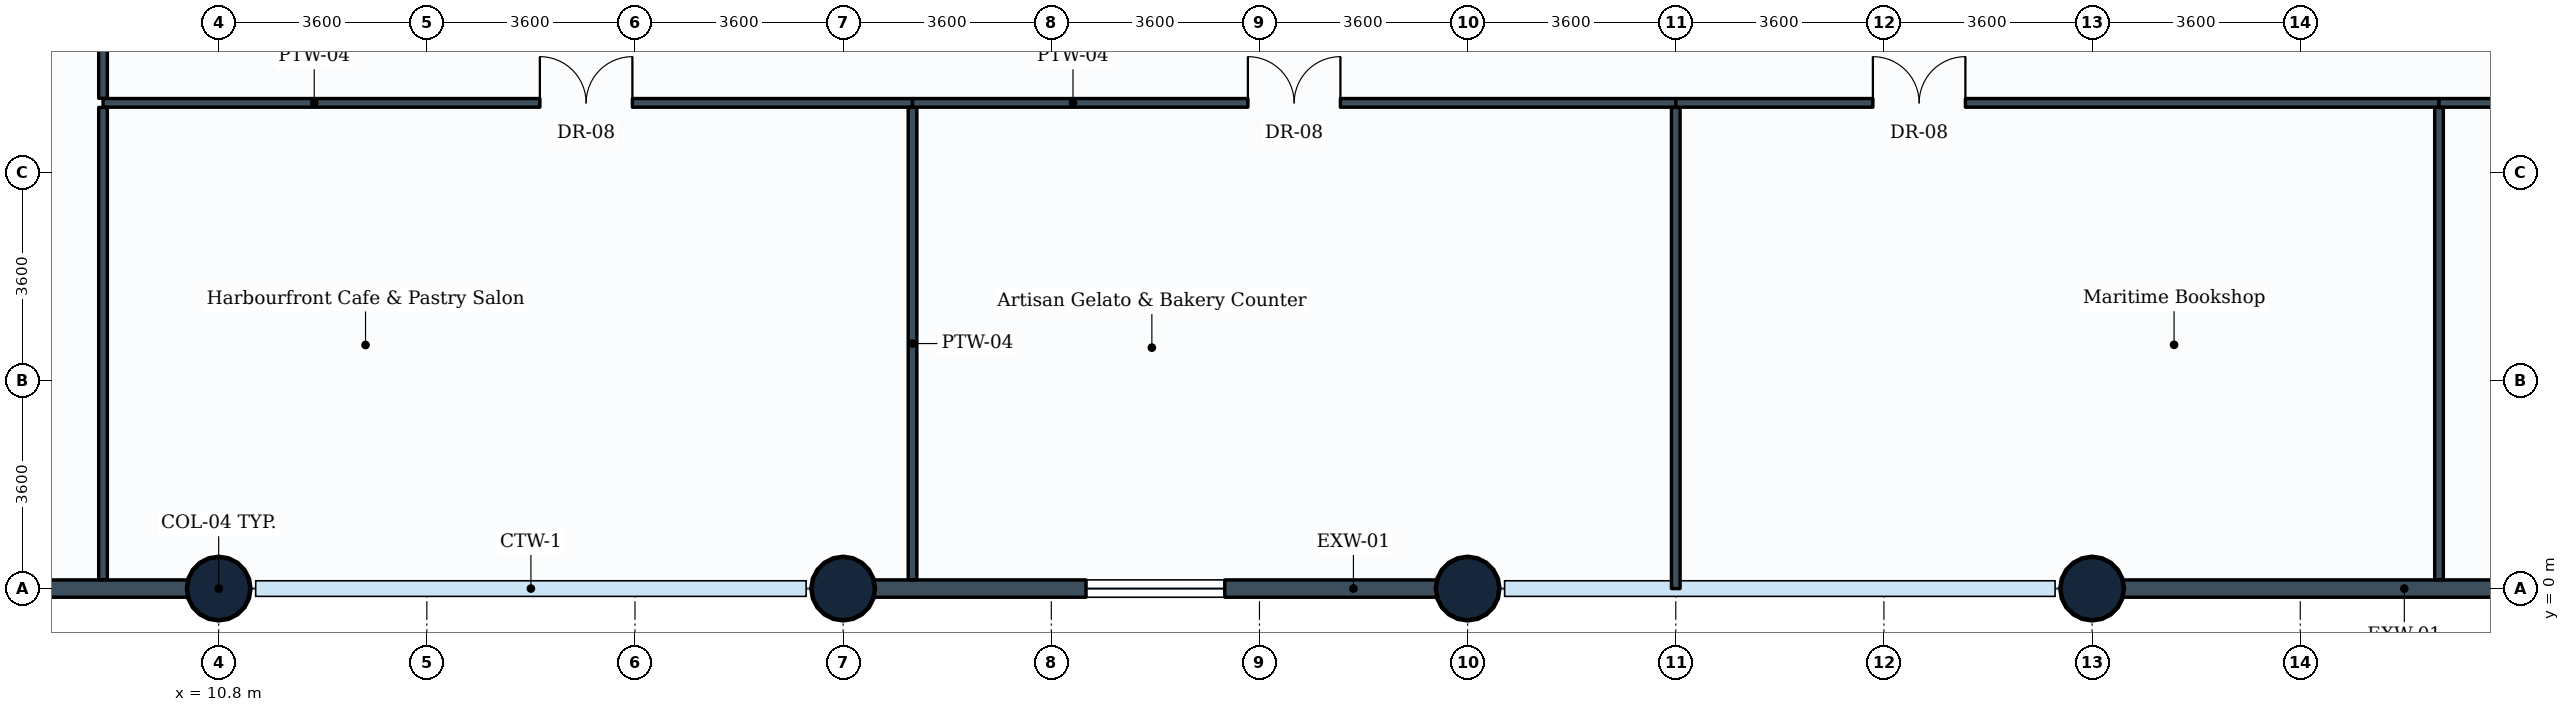
"""IFC4 building model, lengths in metres.
Left out: names, types, materials, properties, quantities, classifications, styles, units other than length and angle.
Written with IfcOpenShell. Run it as: python <this file> out.ifc"""

import sys

from ifc_helpers import new_model, si_unit, direction, frame, frame_2d, origin, origin_2d, place, context, subcontext, project, spatial, rectangle, circle, extrude, element, fill, save


model = new_model("IFC4")
c1 = context("Model", 3, precision=1e-05, world=origin(), true_north=direction((0.0, 1.0)))
c2 = subcontext(c1, "Body", "Model", "MODEL_VIEW")
j1 = project(units=[si_unit("LENGTHUNIT", "METRE"), si_unit("PLANEANGLEUNIT", "RADIAN")], contexts=[c1])
p1 = place(None, origin())
s1 = spatial("IfcSite", under=j1, at=p1, CompositionType="ELEMENT")
p2 = place(p1, origin())
s2 = spatial("IfcBuilding", under=s1, at=p2, CompositionType="ELEMENT")
p3 = place(p2, frame((0.0, 0.0, 5.4)))
s3 = spatial("IfcBuildingStorey", under=s2, at=p3, CompositionType="ELEMENT", Elevation=5.4)
for number, where, z_axis, x_axis in (
    (1, (10.8, 0.0, 0.0), (0.0, 0.0, 1.0), (1.0, 0.0, 0.0)),
    (2, (21.6, 0.0, 0.0), (0.0, 0.0, 1.0), (1.0, 0.0, 0.0)),
    (3, (32.4, 0.0, 0.0), (0.0, 0.0, 1.0), (1.0, 0.0, 0.0)),
    (4, (43.2, 0.0, 0.0), (0.0, 0.0, 1.0), (1.0, 0.0, 0.0)),
):
    element("IfcColumn", number, at=place(p3, frame(where, z_axis=z_axis, x_axis=x_axis)), inside=s3, PredefinedType="COLUMN", context=c2, shape_type="SweptSolid", body=[
        extrude(circle(Radius=0.55, at=origin_2d()), origin(), (0.0, 0.0, 1.0), 4.8),
    ])
p4 = place(p3, frame((10.8, 0.0, 0.0), z_axis=(0.0, 0.0, 1.0), x_axis=(-1.0, 0.0, 0.0)))
e5 = element("IfcWall", 5, at=p4, inside=s3, PredefinedType="STANDARD", context=c2, shape_type="SweptSolid", body=[
    extrude(rectangle(XDim=10.8, YDim=0.3, at=frame_2d((5.4, 0.0))), origin(), (0.0, 0.0, 1.0), 3.83),
])
p5 = place(p4, frame((4.1, 0.0, 0.85)))
e6 = element("IfcOpeningElement", 6, at=p5, cuts=e5, PredefinedType="OPENING", context=c2, shape_type="SweptSolid", body=[
    extrude(rectangle(XDim=2.4, YDim=1.6, at=frame_2d((1.2, 0.8))), frame((0.0, 0.16, 0.0), z_axis=(0.0, -1.0, 0.0), x_axis=(1.0, 0.0, 0.0)), (0.0, 0.0, 1.0), 0.32),
])
p6 = place(p3, frame((32.4, 0.0, 0.0), z_axis=(0.0, 0.0, 1.0), x_axis=(-1.0, 0.0, 0.0)))
e7 = element("IfcWall", 7, at=p6, inside=s3, PredefinedType="STANDARD", context=c2, shape_type="SweptSolid", body=[
    extrude(rectangle(XDim=10.8, YDim=0.3, at=frame_2d((5.4, 0.0))), origin(), (0.0, 0.0, 1.0), 3.83),
])
p7 = place(p6, frame((4.2, 0.0, 0.85)))
e8 = element("IfcOpeningElement", 8, at=p7, cuts=e7, PredefinedType="OPENING", context=c2, shape_type="SweptSolid", body=[
    extrude(rectangle(XDim=2.4, YDim=1.6, at=frame_2d((1.2, 0.8))), frame((0.0, 0.16, 0.0), z_axis=(0.0, -1.0, 0.0), x_axis=(1.0, 0.0, 0.0)), (0.0, 0.0, 1.0), 0.32),
])
p8 = place(p3, frame((54.0, 0.0, 0.0), z_axis=(0.0, 0.0, 1.0), x_axis=(-1.0, 0.0, 0.0)))
e9 = element("IfcWall", 9, at=p8, inside=s3, PredefinedType="STANDARD", context=c2, shape_type="SweptSolid", body=[
    extrude(rectangle(XDim=10.8, YDim=0.3, at=frame_2d((5.4, 0.0))), origin(), (0.0, 0.0, 1.0), 3.83),
])
p9 = place(p3, frame((8.8, 8.4, 0.0), z_axis=(0.0, 0.0, 1.0), x_axis=(1.0, 0.0, 0.0)))
e10 = element("IfcWall", 10, at=p9, inside=s3, PredefinedType="PARTITIONING", context=c2, shape_type="SweptSolid", body=[
    extrude(rectangle(XDim=14.0, YDim=0.15, at=frame_2d((7.0, 0.0))), origin(), (0.0, 0.0, 1.0), 3.83),
])
p10 = place(p9, frame((7.555, 0.0, 0.0)))
e11 = element("IfcOpeningElement", 11, at=p10, cuts=e10, PredefinedType="OPENING", context=c2, shape_type="SweptSolid", body=[
    extrude(rectangle(XDim=1.6, YDim=2.2, at=frame_2d((0.8, 1.1))), frame((0.0, 0.085, 0.0), z_axis=(0.0, -1.0, 0.0), x_axis=(1.0, 0.0, 0.0)), (0.0, 0.0, 1.0), 0.17),
])
p11 = place(p3, frame((22.8, 0.154, 0.0), z_axis=(0.0, 0.0, 1.0), x_axis=(0.0, 1.0, 0.0)))
e12 = element("IfcWall", 12, at=p11, inside=s3, PredefinedType="PARTITIONING", context=c2, shape_type="SweptSolid", body=[
    extrude(rectangle(XDim=8.167, YDim=0.15, at=frame_2d((4.083, 0.0))), origin(), (0.0, 0.0, 1.0), 4.485),
])
p12 = place(p3, frame((22.8, 8.4, 0.0), z_axis=(0.0, 0.0, 1.0), x_axis=(1.0, 0.0, 0.0)))
e13 = element("IfcWall", 13, at=p12, inside=s3, PredefinedType="PARTITIONING", context=c2, shape_type="SweptSolid", body=[
    extrude(rectangle(XDim=13.2, YDim=0.15, at=frame_2d((6.6, 0.0))), origin(), (0.0, 0.0, 1.0), 3.83),
])
p13 = place(p12, frame((5.8, 0.0, 0.0)))
e14 = element("IfcOpeningElement", 14, at=p13, cuts=e13, PredefinedType="OPENING", context=c2, shape_type="SweptSolid", body=[
    extrude(rectangle(XDim=1.6, YDim=2.2, at=frame_2d((0.8, 1.1))), frame((0.0, 0.085, 0.0), z_axis=(0.0, -1.0, 0.0), x_axis=(1.0, 0.0, 0.0)), (0.0, 0.0, 1.0), 0.17),
])
p14 = place(p3, frame((36.0, 0.0, 0.0), z_axis=(0.0, 0.0, 1.0), x_axis=(0.0, 1.0, 0.0)))
e15 = element("IfcWall", 15, at=p14, inside=s3, PredefinedType="PARTITIONING", context=c2, shape_type="SweptSolid", body=[
    extrude(rectangle(XDim=8.321, YDim=0.15, at=frame_2d((4.161, 0.0))), origin(), (0.0, 0.0, 1.0), 3.83),
])
p15 = place(p3, frame((36.0, 8.4, 0.0), z_axis=(0.0, 0.0, 1.0), x_axis=(1.0, 0.0, 0.0)))
e16 = element("IfcWall", 16, at=p15, inside=s3, PredefinedType="PARTITIONING", context=c2, shape_type="SweptSolid", body=[
    extrude(rectangle(XDim=13.2, YDim=0.15, at=frame_2d((6.6, 0.0))), origin(), (0.0, 0.0, 1.0), 3.83),
])
p16 = place(p15, frame((3.409, 0.0, 0.0)))
e17 = element("IfcOpeningElement", 17, at=p16, cuts=e16, PredefinedType="OPENING", context=c2, shape_type="SweptSolid", body=[
    extrude(rectangle(XDim=1.6, YDim=2.2, at=frame_2d((0.8, 1.1))), frame((0.0, 0.085, 0.0), z_axis=(0.0, -1.0, 0.0), x_axis=(1.0, 0.0, 0.0)), (0.0, 0.0, 1.0), 0.17),
])
p17 = place(p3, frame((49.2, 0.154, 0.0), z_axis=(0.0, 0.0, 1.0), x_axis=(0.0, 1.0, 0.0)))
e18 = element("IfcWall", 18, at=p17, inside=s3, PredefinedType="PARTITIONING", context=c2, shape_type="SweptSolid", body=[
    extrude(rectangle(XDim=8.167, YDim=0.15, at=frame_2d((4.083, 0.0))), origin(), (0.0, 0.0, 1.0), 4.485),
])
p18 = place(p3, frame((49.2, 8.4, 0.0), z_axis=(0.0, 0.0, 1.0), x_axis=(1.0, 0.0, 0.0)))
e19 = element("IfcWall", 19, at=p18, inside=s3, PredefinedType="PARTITIONING", context=c2, shape_type="SweptSolid", body=[
    extrude(rectangle(XDim=14.0, YDim=0.15, at=frame_2d((7.0, 0.0))), origin(), (0.0, 0.0, 1.0), 3.83),
])
p19 = place(p18, frame((6.918, 0.0, 0.0)))
e20 = element("IfcOpeningElement", 20, at=p19, cuts=e19, PredefinedType="OPENING", context=c2, shape_type="SweptSolid", body=[
    extrude(rectangle(XDim=1.6, YDim=2.2, at=frame_2d((0.8, 1.1))), frame((0.0, 0.085, 0.0), z_axis=(0.0, -1.0, 0.0), x_axis=(1.0, 0.0, 0.0)), (0.0, 0.0, 1.0), 0.17),
])
p20 = place(p3, frame((8.8, 0.154, 0.0), z_axis=(0.0, 0.0, 1.0), x_axis=(0.0, 1.0, 0.0)))
e21 = element("IfcWall", 21, at=p20, inside=s3, PredefinedType="PARTITIONING", context=c2, shape_type="SweptSolid", body=[
    extrude(rectangle(XDim=8.167, YDim=0.15, at=frame_2d((4.083, 0.0))), origin(), (0.0, 0.0, 1.0), 4.485),
])
p21 = place(p3, frame((8.8, 8.479, 0.0), z_axis=(0.0, 0.0, 1.0), x_axis=(0.0, 1.0, 0.0)))
e22 = element("IfcWall", 22, at=p21, inside=s3, PredefinedType="PARTITIONING", context=c2, shape_type="SweptSolid", body=[
    extrude(rectangle(XDim=8.921, YDim=0.15, at=frame_2d((4.46, 0.0))), origin(), (0.0, 0.0, 1.0), 3.83),
])
p22 = place(p21, frame((5.075, 0.0, 0.0)))
e23 = element("IfcOpeningElement", 23, at=p22, cuts=e22, PredefinedType="OPENING", context=c2, shape_type="SweptSolid", body=[
    extrude(rectangle(XDim=1.0, YDim=2.1, at=frame_2d((0.5, 1.05))), frame((0.0, 0.085, 0.0), z_axis=(0.0, -1.0, 0.0), x_axis=(1.0, 0.0, 0.0)), (0.0, 0.0, 1.0), 0.17),
])
p23 = place(p7, origin())
e24 = element("IfcWindow", 24, at=p23, inside=s3, PartitioningType="SINGLE_PANEL", PredefinedType="WINDOW", context=c2, shape_type="SweptSolid", body=[
    extrude(rectangle(XDim=2.4, YDim=1.6, at=frame_2d((1.2, 0.8))), frame((0.0, 0.03, 0.0), z_axis=(0.0, -1.0, 0.0), x_axis=(1.0, 0.0, 0.0)), (0.0, 0.0, 1.0), 0.06),
])
fill(e8, e24)
p24 = place(p10, origin())
e25 = element("IfcDoor", 25, at=p24, inside=s3, OperationType="DOUBLE_DOOR_SINGLE_SWING", PredefinedType="DOOR", context=c2, shape_type="SweptSolid", body=[
    extrude(rectangle(XDim=1.6, YDim=2.2, at=frame_2d((0.8, 1.1))), frame((0.0, 0.025, 0.0), z_axis=(0.0, -1.0, 0.0), x_axis=(1.0, 0.0, 0.0)), (0.0, 0.0, 1.0), 0.05),
])
fill(e11, e25)
p25 = place(p13, origin())
e26 = element("IfcDoor", 26, at=p25, inside=s3, OperationType="DOUBLE_DOOR_SINGLE_SWING", PredefinedType="DOOR", context=c2, shape_type="SweptSolid", body=[
    extrude(rectangle(XDim=1.6, YDim=2.2, at=frame_2d((0.8, 1.1))), frame((0.0, 0.025, 0.0), z_axis=(0.0, -1.0, 0.0), x_axis=(1.0, 0.0, 0.0)), (0.0, 0.0, 1.0), 0.05),
])
fill(e14, e26)
p26 = place(p16, origin())
e27 = element("IfcDoor", 27, at=p26, inside=s3, OperationType="DOUBLE_DOOR_SINGLE_SWING", PredefinedType="DOOR", context=c2, shape_type="SweptSolid", body=[
    extrude(rectangle(XDim=1.6, YDim=2.2, at=frame_2d((0.8, 1.1))), frame((0.0, 0.025, 0.0), z_axis=(0.0, -1.0, 0.0), x_axis=(1.0, 0.0, 0.0)), (0.0, 0.0, 1.0), 0.05),
])
fill(e17, e27)
save(model, sys.argv[1])
